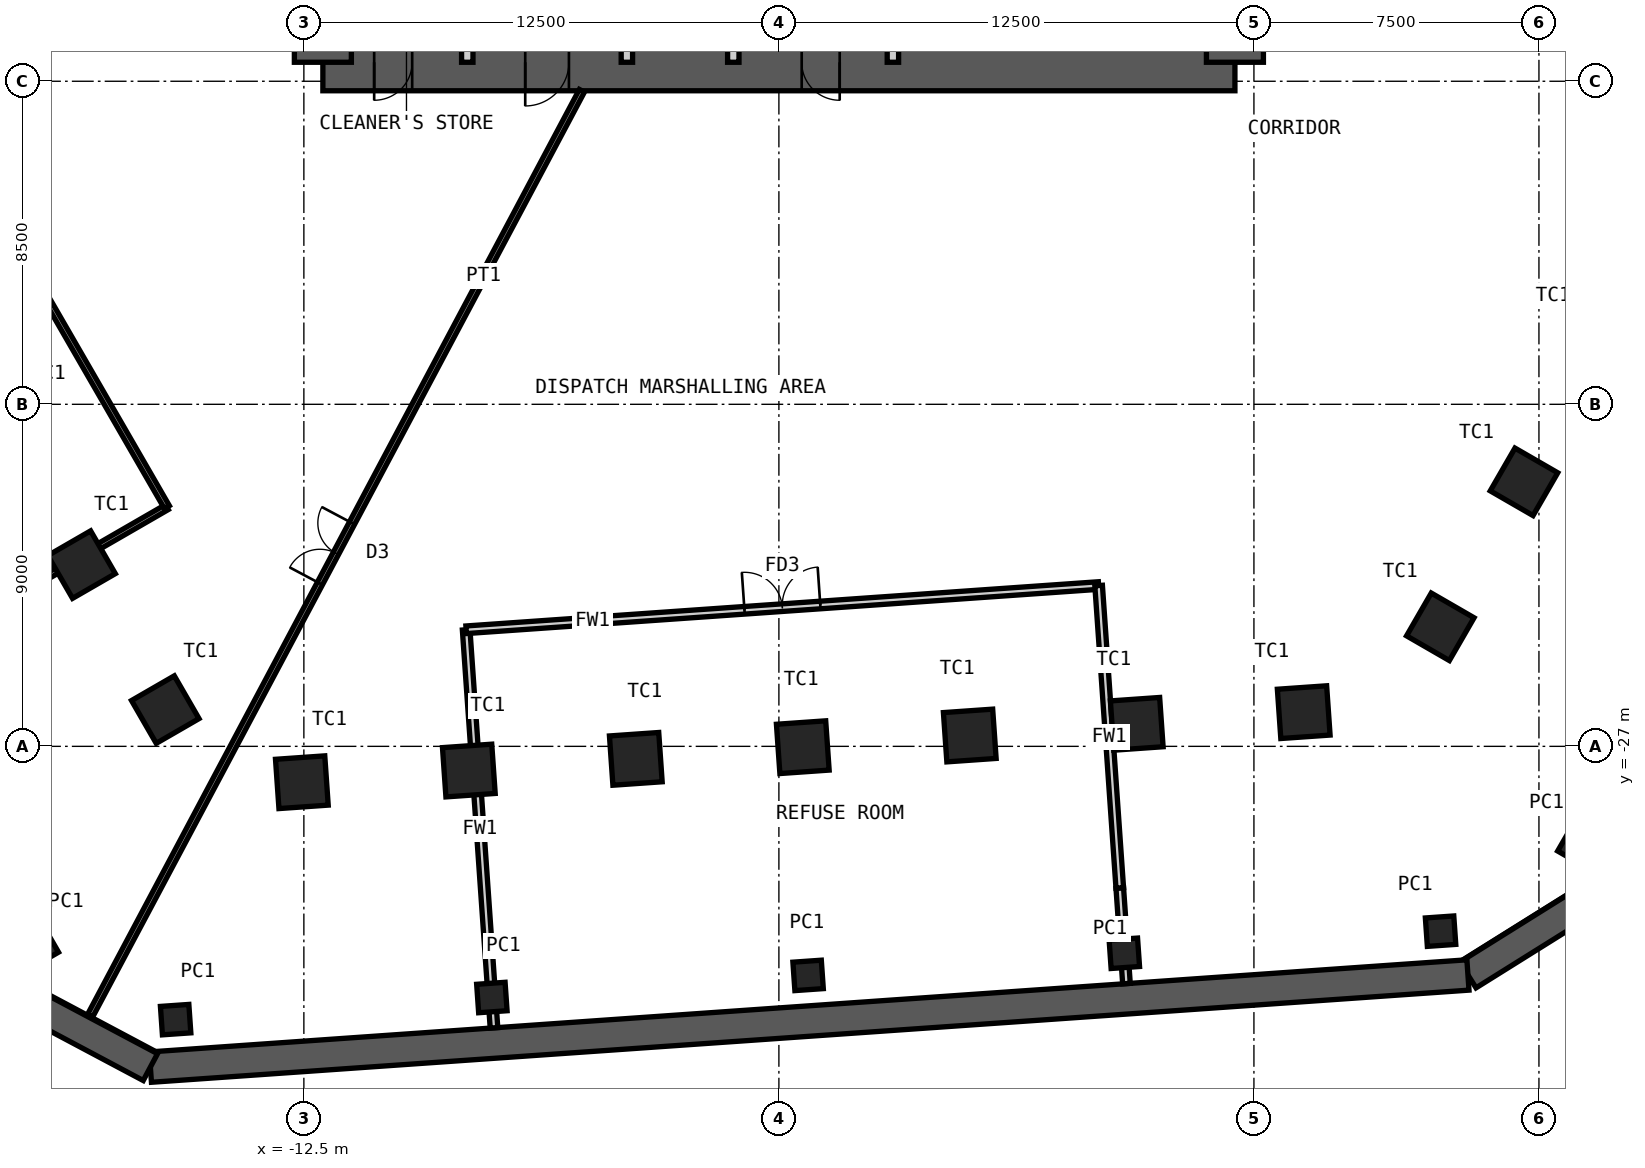
"""IFC4 building model, lengths in metres.
Left out: names, types, materials, properties, quantities, classifications, styles, units other than length and angle.
Written with IfcOpenShell. Run it as: python <this file> out.ifc"""

import sys

from ifc_helpers import new_model, si_unit, direction, frame, frame_2d, origin, origin_2d, place, context, subcontext, project, spatial, rectangle, hollow_rectangle, extrude, element, fill, save


model = new_model("IFC4")
c1 = context("Model", 3, precision=1e-05, world=origin(), true_north=direction((0.0, 1.0)))
c2 = subcontext(c1, "Body", "Model", "MODEL_VIEW")
j1 = project(units=[si_unit("LENGTHUNIT", "METRE"), si_unit("PLANEANGLEUNIT", "RADIAN")], contexts=[c1])
p1 = place(None, origin())
s1 = spatial("IfcSite", under=j1, at=p1, CompositionType="ELEMENT")
p2 = place(p1, origin())
s2 = spatial("IfcBuilding", under=s1, at=p2, CompositionType="ELEMENT")
p3 = place(p2, frame((0.0, 0.0, -6.0)))
s3 = spatial("IfcBuildingStorey", under=s2, at=p3, CompositionType="ELEMENT", Elevation=-6.0)
p4 = place(p3, frame((21.726, -30.77, 0.0), z_axis=(0.0, 0.0, 1.0), x_axis=(-0.848056550838, -0.529905733675, 0.0)))
e1 = element("IfcWall", 1, at=p4, inside=s3, PredefinedType="SHEAR", context=c2, shape_type="SweptSolid", body=[
    extrude(rectangle(XDim=4.238, YDim=0.8, at=frame_2d((2.119, 0.0))), origin(), (0.0, 0.0, 1.0), 6.0),
])
p5 = place(p3, frame((18.132, -33.016, 0.0), z_axis=(0.0, 0.0, 1.0), x_axis=(-0.997564165932, -0.069754819538, 0.0)))
e2 = element("IfcWall", 2, at=p5, inside=s3, PredefinedType="SHEAR", context=c2, shape_type="SweptSolid", body=[
    extrude(rectangle(XDim=34.755, YDim=0.8, at=frame_2d((17.377, 0.0))), origin(), (0.0, 0.0, 1.0), 6.0),
])
p6 = place(p3, frame((-16.539, -35.44, 0.0), z_axis=(0.0, 0.0, 1.0), x_axis=(-0.882968133669, 0.469432929101, 0.0)))
e3 = element("IfcWall", 3, at=p6, inside=s3, PredefinedType="SHEAR", context=c2, shape_type="SweptSolid", body=[
    extrude(rectangle(XDim=4.071, YDim=0.8, at=frame_2d((2.035, 0.0))), origin(), (0.0, 0.0, 1.0), 6.0),
])
for number, where, z_axis, x_axis in (
    (4, (19.607, -20.04, 0.0), (0.0, 0.0, 1.0), (0.5, 0.866, 0.0)),
    (5, (17.405, -23.854, 0.0), (0.0, 0.0, 1.0), (0.5, 0.866, 0.0)),
    (6, (13.811, -26.1, 0.0), (0.0, 0.0, 1.0), (0.998, 0.07, 0.0)),
    (7, (9.417, -26.407, 0.0), (0.0, 0.0, 1.0), (0.998, 0.07, 0.0)),
    (8, (5.023, -26.715, 0.0), (0.0, 0.0, 1.0), (0.998, 0.07, 0.0)),
    (9, (0.629, -27.022, 0.0), (0.0, 0.0, 1.0), (0.998, 0.07, 0.0)),
    (10, (-3.765, -27.329, 0.0), (0.0, 0.0, 1.0), (0.998, 0.07, 0.0)),
    (11, (-8.159, -27.636, 0.0), (0.0, 0.0, 1.0), (0.998, 0.07, 0.0)),
    (12, (-12.553, -27.944, 0.0), (0.0, 0.0, 1.0), (0.998, 0.07, 0.0)),
    (13, (-16.147, -26.033, 0.0), (0.0, 0.0, 1.0), (0.5, -0.866, 0.0)),
    (14, (-18.349, -22.218, 0.0), (0.0, 0.0, 1.0), (0.5, -0.866, 0.0)),
):
    element("IfcColumn", number, at=place(p3, frame(where, z_axis=z_axis, x_axis=x_axis)), inside=s3, PredefinedType="COLUMN", context=c2, shape_type="SweptSolid", body=[
        extrude(hollow_rectangle(XDim=1.3, YDim=1.3, WallThickness=0.1, at=origin_2d()), origin(), (0.0, 0.0, 1.0), 6.0),
    ])
for number, where, z_axis, x_axis in (
    (15, (17.411, -31.863, 0.0), (0.0, 0.0, 1.0), (0.998, 0.07, 0.0)),
    (16, (9.09, -32.445, 0.0), (0.0, 0.0, 1.0), (0.998, 0.07, 0.0)),
    (17, (0.769, -33.027, 0.0), (0.0, 0.0, 1.0), (0.998, 0.07, 0.0)),
    (18, (-7.553, -33.609, 0.0), (0.0, 0.0, 1.0), (0.998, 0.07, 0.0)),
    (19, (-19.469, -32.28, 0.0), (0.0, 0.0, 1.0), (0.5, -0.866, 0.0)),
    (20, (21.006, -29.617, 0.0), (0.0, 0.0, 1.0), (0.5, 0.866, 0.0)),
    (21, (-15.874, -34.191, 0.0), (0.0, 0.0, 1.0), (0.998, 0.07, 0.0)),
):
    element("IfcColumn", number, at=place(p3, frame(where, z_axis=z_axis, x_axis=x_axis)), inside=s3, PredefinedType="COLUMN", context=c2, shape_type="SweptSolid", body=[
        extrude(hollow_rectangle(XDim=0.75, YDim=0.75, WallThickness=0.036, at=origin_2d()), origin(), (0.0, 0.0, 1.0), 6.0),
    ])
p7 = place(p3, frame((-12.0, -9.0, 0.0), z_axis=(0.0, 0.0, 1.0), x_axis=(1.0, 0.0, 0.0)))
e22 = element("IfcWall", 22, at=p7, inside=s3, PredefinedType="SHEAR", context=c2, shape_type="SweptSolid", body=[
    extrude(rectangle(XDim=24.0, YDim=1.5, at=frame_2d((12.0, 0.0))), origin(), (0.0, 0.0, 1.0), 6.0),
])
p8 = place(p7, frame((1.35, 0.0, 0.0)))
e23 = element("IfcOpeningElement", 23, at=p8, cuts=e22, PredefinedType="OPENING", context=c2, shape_type="SweptSolid", body=[
    extrude(rectangle(XDim=1.0, YDim=2.1, at=frame_2d((0.5, 1.05))), frame((0.0, 0.76, 0.0), z_axis=(0.0, -1.0, 0.0), x_axis=(1.0, 0.0, 0.0)), (0.0, 0.0, 1.0), 1.52),
])
p9 = place(p7, frame((5.325, 0.0, 0.0)))
e24 = element("IfcOpeningElement", 24, at=p9, cuts=e22, PredefinedType="OPENING", context=c2, shape_type="SweptSolid", body=[
    extrude(rectangle(XDim=1.15, YDim=2.1, at=frame_2d((0.575, 1.05))), frame((0.0, 0.76, 0.0), z_axis=(0.0, -1.0, 0.0), x_axis=(1.0, 0.0, 0.0)), (0.0, 0.0, 1.0), 1.52),
])
p10 = place(p7, frame((12.6, 0.0, 0.0)))
e25 = element("IfcOpeningElement", 25, at=p10, cuts=e22, PredefinedType="OPENING", context=c2, shape_type="SweptSolid", body=[
    extrude(rectangle(XDim=1.0, YDim=2.1, at=frame_2d((0.5, 1.05))), frame((0.0, 0.76, 0.0), z_axis=(0.0, -1.0, 0.0), x_axis=(1.0, 0.0, 0.0)), (0.0, 0.0, 1.0), 1.52),
])
p11 = place(p3, frame((12.0, -9.0, 0.0), z_axis=(0.0, 0.0, 1.0), x_axis=(0.0, 1.0, 0.0)))
e26 = element("IfcWall", 26, at=p11, inside=s3, PredefinedType="SHEAR", context=c2, shape_type="SweptSolid", body=[
    extrude(rectangle(XDim=18.0, YDim=1.5, at=frame_2d((9.0, 0.0))), origin(), (0.0, 0.0, 1.0), 6.0),
])
p12 = place(p11, frame((8.1, 0.0, 0.0)))
e27 = element("IfcOpeningElement", 27, at=p12, cuts=e26, PredefinedType="OPENING", context=c2, shape_type="SweptSolid", body=[
    extrude(rectangle(XDim=1.8, YDim=2.1, at=frame_2d((0.9, 1.05))), frame((0.0, 0.76, 0.0), z_axis=(0.0, -1.0, 0.0), x_axis=(1.0, 0.0, 0.0)), (0.0, 0.0, 1.0), 1.52),
])
p13 = place(p3, frame((-12.0, -9.0, 0.0), z_axis=(0.0, 0.0, 1.0), x_axis=(0.0, 1.0, 0.0)))
e28 = element("IfcWall", 28, at=p13, inside=s3, PredefinedType="SHEAR", context=c2, shape_type="SweptSolid", body=[
    extrude(rectangle(XDim=18.0, YDim=1.5, at=frame_2d((9.0, 0.0))), origin(), (0.0, 0.0, 1.0), 6.0),
])
p14 = place(p13, frame((8.1, 0.0, 0.0)))
e29 = element("IfcOpeningElement", 29, at=p14, cuts=e28, PredefinedType="OPENING", context=c2, shape_type="SweptSolid", body=[
    extrude(rectangle(XDim=1.8, YDim=2.1, at=frame_2d((0.9, 1.05))), frame((0.0, 0.76, 0.0), z_axis=(0.0, -1.0, 0.0), x_axis=(1.0, 0.0, 0.0)), (0.0, 0.0, 1.0), 1.52),
])
for number, where, z_axis, x_axis in (
    (30, (-8.2, -9.0, 0.0), (0.0, 0.0, 1.0), (0.0, 1.0, 0.0)),
    (31, (-4.0, -9.0, 0.0), (0.0, 0.0, 1.0), (0.0, 1.0, 0.0)),
):
    element("IfcWall", number, at=place(p3, frame(where, z_axis=z_axis, x_axis=x_axis)), inside=s3, PredefinedType="PARTITIONING", context=c2, shape_type="SweptSolid", body=[
        extrude(rectangle(XDim=3.85, YDim=0.3, at=frame_2d((1.925, 0.0))), origin(), (0.0, 0.0, 1.0), 5.78),
    ])
p15 = place(p3, frame((-1.2, -9.0, 0.0), z_axis=(0.0, 0.0, 1.0), x_axis=(0.0, 1.0, 0.0)))
e32 = element("IfcWall", 32, at=p15, inside=s3, PredefinedType="PARTITIONING", context=c2, shape_type="SweptSolid", body=[
    extrude(rectangle(XDim=3.85, YDim=0.3, at=frame_2d((1.925, 0.0))), origin(), (0.0, 0.0, 1.0), 5.78),
])
p16 = place(p15, frame((1.375, 0.0, 0.0)))
e33 = element("IfcOpeningElement", 33, at=p16, cuts=e32, PredefinedType="OPENING", context=c2, shape_type="SweptSolid", body=[
    extrude(rectangle(XDim=1.1, YDim=2.4, at=frame_2d((0.55, 1.2))), frame((0.0, 0.16, 0.0), z_axis=(0.0, -1.0, 0.0), x_axis=(1.0, 0.0, 0.0)), (0.0, 0.0, 1.0), 0.32),
])
p17 = place(p3, frame((3.0, -9.0, 0.0), z_axis=(0.0, 0.0, 1.0), x_axis=(0.0, 1.0, 0.0)))
e34 = element("IfcWall", 34, at=p17, inside=s3, PredefinedType="PARTITIONING", context=c2, shape_type="SweptSolid", body=[
    extrude(rectangle(XDim=3.85, YDim=0.3, at=frame_2d((1.925, 0.0))), origin(), (0.0, 0.0, 1.0), 5.78),
])
p18 = place(p17, frame((1.425, 0.0, 0.0)))
e35 = element("IfcOpeningElement", 35, at=p18, cuts=e34, PredefinedType="OPENING", context=c2, shape_type="SweptSolid", body=[
    extrude(rectangle(XDim=1.0, YDim=2.1, at=frame_2d((0.5, 1.05))), frame((0.0, 0.16, 0.0), z_axis=(0.0, -1.0, 0.0), x_axis=(1.0, 0.0, 0.0)), (0.0, 0.0, 1.0), 0.32),
])
p19 = place(p3, frame((9.146, -33.243, 0.0), z_axis=(0.0, 0.0, 1.0), x_axis=(-0.069554756913, 0.997578135181, 0.0)))
e36 = element("IfcWall", 36, at=p19, inside=s3, PredefinedType="PARTITIONING", context=c2, shape_type="SweptSolid", body=[
    extrude(rectangle(XDim=0.779, YDim=0.2, at=frame_2d((0.39, 0.0))), origin(), (0.0, 0.0, 1.0), 5.75),
])
p20 = place(p3, frame((-7.497, -34.407, 0.0), z_axis=(0.0, 0.0, 1.0), x_axis=(-0.069754853754, 0.997564163539, 0.0)))
e37 = element("IfcWall", 37, at=p20, inside=s3, PredefinedType="PARTITIONING", context=c2, shape_type="SweptSolid", body=[
    extrude(rectangle(XDim=10.5, YDim=0.2, at=frame_2d((5.25, 0.0))), origin(), (0.0, 0.0, 1.0), 5.75),
])
p21 = place(p3, frame((8.413, -22.769, 0.0), z_axis=(0.0, 0.0, 1.0), x_axis=(-0.997563888187, -0.069758791459, 0.0)))
e38 = element("IfcWall", 38, at=p21, inside=s3, PredefinedType="PARTITIONING", context=c2, shape_type="SweptSolid", body=[
    extrude(rectangle(XDim=16.683, YDim=0.2, at=frame_2d((8.342, 0.0))), origin(), (0.0, 0.0, 1.0), 5.75),
])
p22 = place(p21, frame((7.342, 0.0, 0.0)))
e39 = element("IfcOpeningElement", 39, at=p22, cuts=e38, PredefinedType="OPENING", context=c2, shape_type="SweptSolid", body=[
    extrude(rectangle(XDim=2.0, YDim=2.4, at=frame_2d((1.0, 1.2))), frame((0.0, 0.11, 0.0), z_axis=(0.0, -1.0, 0.0), x_axis=(1.0, 0.0, 0.0)), (0.0, 0.0, 1.0), 0.22),
])
p23 = place(p3, frame((-24.332, -25.455, 0.0), z_axis=(0.0, 0.0, 1.0), x_axis=(0.86602681393, 0.499997557548, 0.0)))
e40 = element("IfcWall", 40, at=p23, inside=s3, PredefinedType="PARTITIONING", context=c2, shape_type="SweptSolid", body=[
    extrude(rectangle(XDim=9.5, YDim=0.15, at=frame_2d((4.75, 0.0))), origin(), (0.0, 0.0, 1.0), 5.75),
])
p24 = place(p3, frame((-16.105, -20.705, 0.0), z_axis=(0.0, 0.0, 1.0), x_axis=(-0.500004511595, 0.866022798998, 0.0)))
e41 = element("IfcWall", 41, at=p24, inside=s3, PredefinedType="PARTITIONING", context=c2, shape_type="SweptSolid", body=[
    extrude(rectangle(XDim=16.683, YDim=0.15, at=frame_2d((8.342, 0.0))), origin(), (0.0, 0.0, 1.0), 5.75),
])
p25 = place(p24, frame((7.442, 0.0, 0.0)))
e42 = element("IfcOpeningElement", 42, at=p25, cuts=e41, PredefinedType="OPENING", context=c2, shape_type="SweptSolid", body=[
    extrude(rectangle(XDim=1.8, YDim=2.4, at=frame_2d((0.9, 1.2))), frame((0.0, 0.085, 0.0), z_axis=(0.0, -1.0, 0.0), x_axis=(1.0, 0.0, 0.0)), (0.0, 0.0, 1.0), 0.17),
])
p26 = place(p3, frame((-5.184, -9.75, 0.0), z_axis=(0.0, 0.0, 1.0), x_axis=(-0.469470342993, -0.882948241433, 0.0)))
e43 = element("IfcWall", 43, at=p26, inside=s3, PredefinedType="PARTITIONING", context=c2, shape_type="SweptSolid", body=[
    extrude(rectangle(XDim=27.565, YDim=0.15, at=frame_2d((13.783, 0.0))), origin(), (0.0, 0.0, 1.0), 5.75),
])
p27 = place(p26, frame((12.883, 0.0, 0.0)))
e44 = element("IfcOpeningElement", 44, at=p27, cuts=e43, PredefinedType="OPENING", context=c2, shape_type="SweptSolid", body=[
    extrude(rectangle(XDim=1.8, YDim=2.4, at=frame_2d((0.9, 1.2))), frame((0.0, 0.085, 0.0), z_axis=(0.0, -1.0, 0.0), x_axis=(1.0, 0.0, 0.0)), (0.0, 0.0, 1.0), 0.17),
])
p28 = place(p3, frame((9.092, -32.466, 0.0), z_axis=(0.0, 0.0, 1.0), x_axis=(-0.069873717935, 0.997555844824, 0.0)))
e45 = element("IfcWall", 45, at=p28, inside=s3, PredefinedType="PARTITIONING", context=c2, shape_type="SweptSolid", body=[
    extrude(rectangle(XDim=1.743, YDim=0.2, at=frame_2d((0.872, 0.0))), origin(), (0.0, 0.0, 1.0), 4.65),
])
p29 = place(p3, frame((8.97, -30.726, 0.0), z_axis=(0.0, 0.0, 1.0), x_axis=(-0.069748420123, 0.997564613391, 0.0)))
e46 = element("IfcWall", 46, at=p29, inside=s3, PredefinedType="PARTITIONING", context=c2, shape_type="SweptSolid", body=[
    extrude(rectangle(XDim=7.977, YDim=0.2, at=frame_2d((3.989, 0.0))), origin(), (0.0, 0.0, 1.0), 5.75),
])
p30 = place(p8, origin())
e47 = element("IfcDoor", 47, at=p30, inside=s3, OperationType="SINGLE_SWING_LEFT", PredefinedType="DOOR", context=c2, shape_type="SweptSolid", body=[
    extrude(rectangle(XDim=1.0, YDim=2.1, at=frame_2d((0.5, 1.05))), frame((0.0, 0.025, 0.0), z_axis=(0.0, -1.0, 0.0), x_axis=(1.0, 0.0, 0.0)), (0.0, 0.0, 1.0), 0.05),
])
fill(e23, e47)
p31 = place(p9, origin())
e48 = element("IfcDoor", 48, at=p31, inside=s3, OperationType="SINGLE_SWING_LEFT", PredefinedType="DOOR", context=c2, shape_type="SweptSolid", body=[
    extrude(rectangle(XDim=1.15, YDim=2.1, at=frame_2d((0.575, 1.05))), frame((0.0, 0.025, 0.0), z_axis=(0.0, -1.0, 0.0), x_axis=(1.0, 0.0, 0.0)), (0.0, 0.0, 1.0), 0.05),
])
fill(e24, e48)
p32 = place(p10, origin())
e49 = element("IfcDoor", 49, at=p32, inside=s3, OperationType="SINGLE_SWING_RIGHT", PredefinedType="DOOR", context=c2, shape_type="SweptSolid", body=[
    extrude(rectangle(XDim=1.0, YDim=2.1, at=frame_2d((0.5, 1.05))), frame((0.0, 0.025, 0.0), z_axis=(0.0, -1.0, 0.0), x_axis=(1.0, 0.0, 0.0)), (0.0, 0.0, 1.0), 0.05),
])
fill(e25, e49)
p33 = place(p22, origin())
e50 = element("IfcDoor", 50, at=p33, inside=s3, OperationType="DOUBLE_DOOR_DOUBLE_SWING", PredefinedType="DOOR", context=c2, shape_type="SweptSolid", body=[
    extrude(rectangle(XDim=2.0, YDim=2.4, at=frame_2d((1.0, 1.2))), frame((0.0, 0.025, 0.0), z_axis=(0.0, -1.0, 0.0), x_axis=(1.0, 0.0, 0.0)), (0.0, 0.0, 1.0), 0.05),
])
fill(e39, e50)
p34 = place(p27, origin())
e51 = element("IfcDoor", 51, at=p34, inside=s3, OperationType="DOUBLE_DOOR_DOUBLE_SWING", PredefinedType="DOOR", context=c2, shape_type="SweptSolid", body=[
    extrude(rectangle(XDim=1.8, YDim=2.4, at=frame_2d((0.9, 1.2))), frame((0.0, 0.025, 0.0), z_axis=(0.0, -1.0, 0.0), x_axis=(1.0, 0.0, 0.0)), (0.0, 0.0, 1.0), 0.05),
])
fill(e44, e51)
save(model, sys.argv[1])
